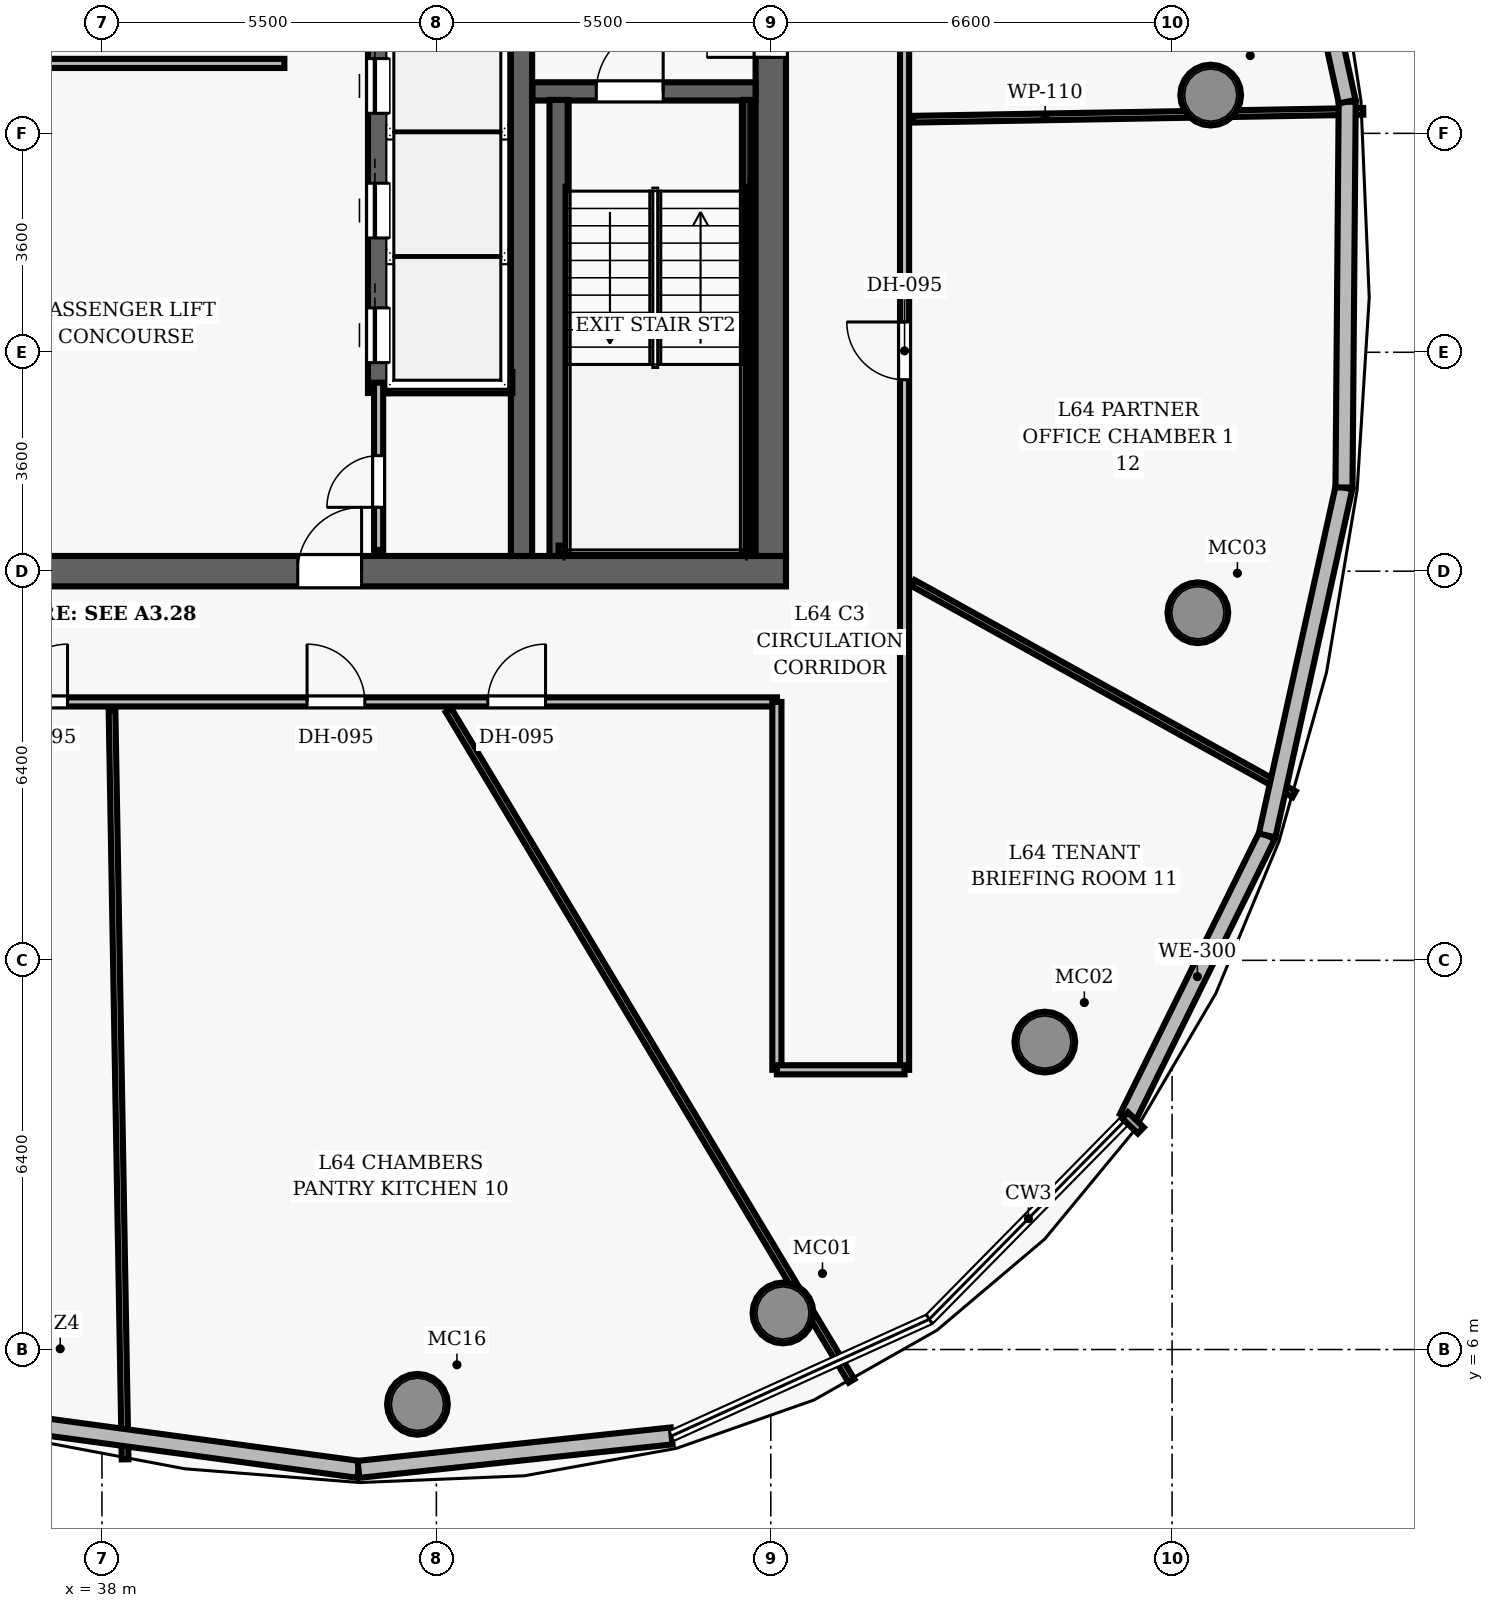
"""IFC4 building model, lengths in metres.
Left out: names, types, materials, properties, quantities, classifications, styles, units other than length and angle.
Written with IfcOpenShell. Run it as: python <this file> out.ifc"""

import sys

from ifc_helpers import new_model, si_unit, direction, frame, frame_2d, origin, origin_2d, place, context, subcontext, project, spatial, rectangle, hollow_circle, extrude, element, fill, save


model = new_model("IFC4")
c1 = context("Model", 3, precision=1e-05, world=origin(), true_north=direction((0.0, 1.0)))
c2 = subcontext(c1, "Body", "Model", "MODEL_VIEW")
j1 = project(units=[si_unit("LENGTHUNIT", "METRE"), si_unit("PLANEANGLEUNIT", "RADIAN")], contexts=[c1])
p1 = place(None, origin())
s1 = spatial("IfcSite", under=j1, at=p1, CompositionType="ELEMENT")
p2 = place(p1, origin())
s2 = spatial("IfcBuilding", under=s1, at=p2, CompositionType="ELEMENT")
p3 = place(p2, frame((0.0, 0.0, 253.6)))
s3 = spatial("IfcBuildingStorey", under=s2, at=p3, CompositionType="ELEMENT", Elevation=253.6)
p4 = place(p3, frame((26.75, 18.8, 0.0), z_axis=(0.0, 0.0, 1.0), x_axis=(1.0, 0.0, 0.0)))
e1 = element("IfcWall", 1, at=p4, inside=s3, PredefinedType="SHEAR", context=c2, shape_type="SweptSolid", body=[
    extrude(rectangle(XDim=22.5, YDim=0.5, at=frame_2d((11.25, 0.0))), origin(), (0.0, 0.0, 1.0), 3.85),
])
p5 = place(p4, frame((14.47, 0.0, 0.0)))
e2 = element("IfcOpeningElement", 2, at=p5, cuts=e1, PredefinedType="OPENING", context=c2, shape_type="SweptSolid", body=[
    extrude(rectangle(XDim=1.05, YDim=2.15, at=frame_2d((0.525, 1.075))), frame((0.0, 0.26, 0.0), z_axis=(0.0, -1.0, 0.0), x_axis=(1.0, 0.0, 0.0)), (0.0, 0.0, 1.0), 0.52),
])
p6 = place(p3, frame((49.0, 19.05, 0.0), z_axis=(0.0, 0.0, 1.0), x_axis=(0.0, 1.0, 0.0)))
e3 = element("IfcWall", 3, at=p6, inside=s3, PredefinedType="SHEAR", context=c2, shape_type="SweptSolid", body=[
    extrude(rectangle(XDim=13.9, YDim=0.5, at=frame_2d((6.95, 0.0))), origin(), (0.0, 0.0, 1.0), 3.85),
])
p7 = place(p6, frame((8.2, 0.0, 0.0)))
e4 = element("IfcOpeningElement", 4, at=p7, cuts=e3, PredefinedType="OPENING", context=c2, shape_type="SweptSolid", body=[
    extrude(rectangle(XDim=1.05, YDim=2.15, at=frame_2d((0.525, 1.075))), frame((0.0, 0.26, 0.0), z_axis=(0.0, -1.0, 0.0), x_axis=(1.0, 0.0, 0.0)), (0.0, 0.0, 1.0), 0.52),
])
p8 = place(p3, frame((44.9, 19.05, 0.0), z_axis=(0.0, 0.0, 1.0), x_axis=(0.0, 1.0, 0.0)))
e5 = element("IfcWall", 5, at=p8, inside=s3, PredefinedType="SHEAR", context=c2, shape_type="SweptSolid", body=[
    extrude(rectangle(XDim=13.9, YDim=0.35, at=frame_2d((6.95, 0.0))), origin(), (0.0, 0.0, 1.0), 3.85),
])
for number, where, z_axis, x_axis in (
    (6, (49.2, 6.601, 0.0), (0.0, 0.0, 1.0), (1.0, 0.0, 0.0)),
    (7, (53.506, 11.056, 0.0), (0.0, 0.0, 1.0), (1.0, 0.0, 0.0)),
    (8, (56.024, 18.116, 0.0), (0.0, 0.0, 1.0), (1.0, 0.0, 0.0)),
    (9, (56.235, 26.629, 0.0), (0.0, 0.0, 1.0), (1.0, 0.0, 0.0)),
    (10, (43.188, 5.099, 0.0), (0.0, 0.0, 1.0), (1.0, 0.0, 0.0)),
):
    element("IfcColumn", number, at=place(p3, frame(where, z_axis=z_axis, x_axis=x_axis)), inside=s3, PredefinedType="COLUMN", context=c2, shape_type="SweptSolid", body=[
        extrude(hollow_circle(Radius=0.5, WallThickness=0.045, at=origin_2d()), origin(), (0.0, 0.0, 1.0), 3.85),
    ])
p9 = place(p3, frame((45.08, 26.69, 0.0), z_axis=(0.0, 0.0, 1.0), x_axis=(1.0, 0.0, 0.0)))
e11 = element("IfcWall", 11, at=p9, inside=s3, PredefinedType="SHEAR", context=c2, shape_type="SweptSolid", body=[
    extrude(rectangle(XDim=3.67, YDim=0.3, at=frame_2d((1.835, 0.0))), origin(), (0.0, 0.0, 1.0), 3.85),
])
p10 = place(p9, frame((1.05, 0.0, 0.0)))
e12 = element("IfcOpeningElement", 12, at=p10, cuts=e11, PredefinedType="OPENING", context=c2, shape_type="SweptSolid", body=[
    extrude(rectangle(XDim=1.1, YDim=2.15, at=frame_2d((0.55, 1.075))), frame((0.0, 0.16, 0.0), z_axis=(0.0, -1.0, 0.0), x_axis=(1.0, 0.0, 0.0)), (0.0, 0.0, 1.0), 0.32),
])
p11 = place(p3, frame((45.51, 19.05, 0.0), z_axis=(0.0, 0.0, 1.0), x_axis=(0.0, 1.0, 0.0)))
e13 = element("IfcWall", 13, at=p11, inside=s3, PredefinedType="SHEAR", context=c2, shape_type="SweptSolid", body=[
    extrude(rectangle(XDim=7.5, YDim=0.3, at=frame_2d((3.75, 0.0))), origin(), (0.0, 0.0, 1.0), 3.85),
])
p12 = place(p3, frame((48.605, 19.1, 0.0), z_axis=(0.0, 0.0, 1.0), x_axis=(0.0, 1.0, 0.0)))
e14 = element("IfcWall", 14, at=p12, inside=s3, PredefinedType="SHEAR", context=c2, shape_type="SweptSolid", body=[
    extrude(rectangle(XDim=7.45, YDim=0.12, at=frame_2d((3.725, 0.0))), origin(), (0.0, 0.0, 1.0), 3.85),
])
p13 = place(p3, frame((45.51, 19.16, 0.0), z_axis=(0.0, 0.0, 1.0), x_axis=(1.0, 0.0, 0.0)))
e15 = element("IfcWall", 15, at=p13, inside=s3, PredefinedType="SHEAR", context=c2, shape_type="SweptSolid", body=[
    extrude(rectangle(XDim=3.095, YDim=0.12, at=frame_2d((1.547, 0.0))), origin(), (0.0, 0.0, 1.0), 3.85),
])
p14 = place(p3, frame((42.55, 21.73, 0.0), z_axis=(0.0, 0.0, 1.0), x_axis=(0.0, 1.0, 0.0)))
e16 = element("IfcWall", 16, at=p14, inside=s3, PredefinedType="SHEAR", context=c2, shape_type="SweptSolid", body=[
    extrude(rectangle(XDim=6.54, YDim=0.35, at=frame_2d((3.27, 0.0))), origin(), (0.0, 0.0, 1.0), 3.04),
])
p15 = place(p14, frame((0.5, 0.0, 0.0)))
e17 = element("IfcOpeningElement", 17, at=p15, cuts=e16, PredefinedType="OPENING", context=c2, shape_type="SweptSolid", body=[
    extrude(rectangle(XDim=0.9, YDim=2.15, at=frame_2d((0.45, 1.075))), frame((0.0, 0.185, 0.0), z_axis=(0.0, -1.0, 0.0), x_axis=(1.0, 0.0, 0.0)), (0.0, 0.0, 1.0), 0.37),
])
p16 = place(p14, frame((2.55, 0.0, 0.0)))
e18 = element("IfcOpeningElement", 18, at=p16, cuts=e16, PredefinedType="OPENING", context=c2, shape_type="SweptSolid", body=[
    extrude(rectangle(XDim=0.9, YDim=2.15, at=frame_2d((0.45, 1.075))), frame((0.0, 0.185, 0.0), z_axis=(0.0, -1.0, 0.0), x_axis=(1.0, 0.0, 0.0)), (0.0, 0.0, 1.0), 0.37),
])
p17 = place(p14, frame((4.6, 0.0, 0.0)))
e19 = element("IfcOpeningElement", 19, at=p17, cuts=e16, PredefinedType="OPENING", context=c2, shape_type="SweptSolid", body=[
    extrude(rectangle(XDim=0.9, YDim=2.15, at=frame_2d((0.45, 1.075))), frame((0.0, 0.185, 0.0), z_axis=(0.0, -1.0, 0.0), x_axis=(1.0, 0.0, 0.0)), (0.0, 0.0, 1.0), 0.37),
])
p18 = place(p3, frame((42.72, 21.9, 0.0), z_axis=(0.0, 0.0, 1.0), x_axis=(1.0, 0.0, 0.0)))
e20 = element("IfcWall", 20, at=p18, inside=s3, PredefinedType="SHEAR", context=c2, shape_type="SweptSolid", body=[
    extrude(rectangle(XDim=2.03, YDim=0.35, at=frame_2d((1.015, 0.0))), origin(), (0.0, 0.0, 1.0), 3.04),
])
p19 = place(p3, frame((34.64, 27.15, 0.0), z_axis=(0.0, 0.0, 1.0), x_axis=(1.0, 0.0, 0.0)))
e21 = element("IfcWall", 21, at=p19, inside=s3, PredefinedType="PARTITIONING", context=c2, shape_type="SweptSolid", body=[
    extrude(rectangle(XDim=6.36, YDim=0.15, at=frame_2d((3.18, 0.0))), origin(), (0.0, 0.0, 1.0), 3.04),
])
p20 = place(p3, frame((42.55, 19.15, 0.0), z_axis=(0.0, 0.0, 1.0), x_axis=(0.0, 1.0, 0.0)))
e22 = element("IfcWall", 22, at=p20, inside=s3, PredefinedType="PARTITIONING", context=c2, shape_type="SweptSolid", body=[
    extrude(rectangle(XDim=2.75, YDim=0.15, at=frame_2d((1.375, 0.0))), origin(), (0.0, 0.0, 1.0), 3.04),
])
p21 = place(p20, frame((0.7, 0.0, 0.0)))
e23 = element("IfcOpeningElement", 23, at=p21, cuts=e22, PredefinedType="OPENING", context=c2, shape_type="SweptSolid", body=[
    extrude(rectangle(XDim=0.85, YDim=2.1, at=frame_2d((0.425, 1.05))), frame((0.0, 0.085, 0.0), z_axis=(0.0, -1.0, 0.0), x_axis=(1.0, 0.0, 0.0)), (0.0, 0.0, 1.0), 0.17),
])
p22 = place(p3, frame((26.9, 16.65, 0.0), z_axis=(0.0, 0.0, 1.0), x_axis=(1.0, 0.0, 0.0)))
e24 = element("IfcWall", 24, at=p22, inside=s3, PredefinedType="PARTITIONING", context=c2, shape_type="SweptSolid", body=[
    extrude(rectangle(XDim=22.2, YDim=0.15, at=frame_2d((11.1, 0.0))), origin(), (0.0, 0.0, 1.0), 3.04),
])
p23 = place(p22, frame((4.135, 0.0, 0.0)))
e25 = element("IfcOpeningElement", 25, at=p23, cuts=e24, PredefinedType="OPENING", context=c2, shape_type="SweptSolid", body=[
    extrude(rectangle(XDim=0.95, YDim=2.15, at=frame_2d((0.475, 1.075))), frame((0.0, 0.085, 0.0), z_axis=(0.0, -1.0, 0.0), x_axis=(1.0, 0.0, 0.0)), (0.0, 0.0, 1.0), 0.17),
])
p24 = place(p22, frame((9.584, 0.0, 0.0)))
e26 = element("IfcOpeningElement", 26, at=p24, cuts=e24, PredefinedType="OPENING", context=c2, shape_type="SweptSolid", body=[
    extrude(rectangle(XDim=0.95, YDim=2.15, at=frame_2d((0.475, 1.075))), frame((0.0, 0.085, 0.0), z_axis=(0.0, -1.0, 0.0), x_axis=(1.0, 0.0, 0.0)), (0.0, 0.0, 1.0), 0.17),
])
p25 = place(p22, frame((14.473, 0.0, 0.0)))
e27 = element("IfcOpeningElement", 27, at=p25, cuts=e24, PredefinedType="OPENING", context=c2, shape_type="SweptSolid", body=[
    extrude(rectangle(XDim=0.95, YDim=2.15, at=frame_2d((0.475, 1.075))), frame((0.0, 0.085, 0.0), z_axis=(0.0, -1.0, 0.0), x_axis=(1.0, 0.0, 0.0)), (0.0, 0.0, 1.0), 0.17),
])
p26 = place(p22, frame((17.445, 0.0, 0.0)))
e28 = element("IfcOpeningElement", 28, at=p26, cuts=e24, PredefinedType="OPENING", context=c2, shape_type="SweptSolid", body=[
    extrude(rectangle(XDim=0.95, YDim=2.15, at=frame_2d((0.475, 1.075))), frame((0.0, 0.085, 0.0), z_axis=(0.0, -1.0, 0.0), x_axis=(1.0, 0.0, 0.0)), (0.0, 0.0, 1.0), 0.17),
])
p27 = place(p3, frame((51.2, 10.6, 0.0), z_axis=(0.0, 0.0, 1.0), x_axis=(0.0, 1.0, 0.0)))
e29 = element("IfcWall", 29, at=p27, inside=s3, PredefinedType="PARTITIONING", context=c2, shape_type="SweptSolid", body=[
    extrude(rectangle(XDim=30.8, YDim=0.15, at=frame_2d((15.4, 0.0))), origin(), (0.0, 0.0, 1.0), 3.04),
])
p28 = place(p27, frame((17.79, 0.0, 0.0)))
e30 = element("IfcOpeningElement", 30, at=p28, cuts=e29, PredefinedType="OPENING", context=c2, shape_type="SweptSolid", body=[
    extrude(rectangle(XDim=0.95, YDim=2.15, at=frame_2d((0.475, 1.075))), frame((0.0, 0.085, 0.0), z_axis=(0.0, -1.0, 0.0), x_axis=(1.0, 0.0, 0.0)), (0.0, 0.0, 1.0), 0.17),
])
p29 = place(p27, frame((11.348, 0.0, 0.0)))
e31 = element("IfcOpeningElement", 31, at=p29, cuts=e29, PredefinedType="OPENING", context=c2, shape_type="SweptSolid", body=[
    extrude(rectangle(XDim=0.95, YDim=2.15, at=frame_2d((0.475, 1.075))), frame((0.0, 0.085, 0.0), z_axis=(0.0, -1.0, 0.0), x_axis=(1.0, 0.0, 0.0)), (0.0, 0.0, 1.0), 0.17),
])
p30 = place(p3, frame((49.1, 10.6, 0.0), z_axis=(0.0, 0.0, 1.0), x_axis=(0.0, 1.0, 0.0)))
e32 = element("IfcWall", 32, at=p30, inside=s3, PredefinedType="PARTITIONING", context=c2, shape_type="SweptSolid", body=[
    extrude(rectangle(XDim=6.05, YDim=0.15, at=frame_2d((3.025, 0.0))), origin(), (0.0, 0.0, 1.0), 3.04),
])
p31 = place(p3, frame((49.1, 10.6, 0.0), z_axis=(0.0, 0.0, 1.0), x_axis=(1.0, 0.0, 0.0)))
e33 = element("IfcWall", 33, at=p31, inside=s3, PredefinedType="PARTITIONING", context=c2, shape_type="SweptSolid", body=[
    extrude(rectangle(XDim=2.1, YDim=0.15, at=frame_2d((1.05, 0.0))), origin(), (0.0, 0.0, 1.0), 3.04),
])
p32 = place(p3, frame((51.34, 26.233, 0.0), z_axis=(0.0, 0.0, 1.0), x_axis=(0.999847881994, 0.017441699244, 0.0)))
e34 = element("IfcWall", 34, at=p32, inside=s3, PredefinedType="PARTITIONING", context=c2, shape_type="SweptSolid", body=[
    extrude(rectangle(XDim=7.405, YDim=0.11, at=frame_2d((3.702, 0.0))), origin(), (0.0, 0.0, 1.0), 3.04),
])
p33 = place(p3, frame((38.166, 16.51, 0.0), z_axis=(0.0, 0.0, 1.0), x_axis=(0.017460864441, -0.999847547486, 0.0)))
e35 = element("IfcWall", 35, at=p33, inside=s3, PredefinedType="PARTITIONING", context=c2, shape_type="SweptSolid", body=[
    extrude(rectangle(XDim=12.318, YDim=0.11, at=frame_2d((6.159, 0.0))), origin(), (0.0, 0.0, 1.0), 3.04),
])
p34 = place(p3, frame((43.702, 16.51, 0.0), z_axis=(0.0, 0.0, 1.0), x_axis=(0.51503438344, -0.85716951875, 0.0)))
e36 = element("IfcWall", 36, at=p34, inside=s3, PredefinedType="PARTITIONING", context=c2, shape_type="SweptSolid", body=[
    extrude(rectangle(XDim=12.862, YDim=0.11, at=frame_2d((6.431, 0.0))), origin(), (0.0, 0.0, 1.0), 3.04),
])
p35 = place(p3, frame((51.34, 18.605, 0.0), z_axis=(0.0, 0.0, 1.0), x_axis=(0.874626215233, -0.484797879149, 0.0)))
e37 = element("IfcWall", 37, at=p35, inside=s3, PredefinedType="PARTITIONING", context=c2, shape_type="SweptSolid", body=[
    extrude(rectangle(XDim=7.165, YDim=0.11, at=frame_2d((3.582, 0.0))), origin(), (0.0, 0.0, 1.0), 3.04),
])
p36 = place(p3, frame((57.163, 14.454, 0.0), z_axis=(0.0, 0.0, 1.0), x_axis=(-0.44296604634, -0.896538388352, 0.0)))
e38 = element("IfcWall", 38, at=p36, inside=s3, PredefinedType="SOLIDWALL", context=c2, shape_type="SweptSolid", body=[
    extrude(rectangle(XDim=5.179, YDim=0.28, at=frame_2d((2.59, 0.0))), origin(), (0.0, 0.0, 1.0), 3.625),
])
p37 = place(p3, frame((58.427, 20.176, 0.0), z_axis=(0.0, 0.0, 1.0), x_axis=(-0.215730402944, -0.976452965199, 0.0)))
e39 = element("IfcWall", 39, at=p37, inside=s3, PredefinedType="SOLIDWALL", context=c2, shape_type="SweptSolid", body=[
    extrude(rectangle(XDim=5.86, YDim=0.28, at=frame_2d((2.93, 0.0))), origin(), (0.0, 0.0, 1.0), 3.625),
])
p38 = place(p3, frame((58.48, 26.521, 0.0), z_axis=(0.0, 0.0, 1.0), x_axis=(-0.008349395362, -0.999965143191, 0.0)))
e40 = element("IfcWall", 40, at=p38, inside=s3, PredefinedType="SOLIDWALL", context=c2, shape_type="SweptSolid", body=[
    extrude(rectangle(XDim=6.345, YDim=0.28, at=frame_2d((3.173, 0.0))), origin(), (0.0, 0.0, 1.0), 3.625),
])
p39 = place(p3, frame((57.09, 32.898, 0.0), z_axis=(0.0, 0.0, 1.0), x_axis=(0.212892433961, -0.977075642702, 0.0)))
e41 = element("IfcWall", 41, at=p39, inside=s3, PredefinedType="SOLIDWALL", context=c2, shape_type="SweptSolid", body=[
    extrude(rectangle(XDim=6.526, YDim=0.28, at=frame_2d((3.263, 0.0))), origin(), (0.0, 0.0, 1.0), 3.625),
])
p40 = place(p3, frame((42.219, 4.029, 0.0), z_axis=(0.0, 0.0, 1.0), x_axis=(-0.990881813427, 0.134733929727, 0.0)))
e42 = element("IfcWall", 42, at=p40, inside=s3, PredefinedType="SOLIDWALL", context=c2, shape_type="SweptSolid", body=[
    extrude(rectangle(XDim=5.86, YDim=0.28, at=frame_2d((2.93, 0.0))), origin(), (0.0, 0.0, 1.0), 3.625),
])
p41 = place(p3, frame((47.369, 4.579, 0.0), z_axis=(0.0, 0.0, 1.0), x_axis=(-0.994344408772, -0.106203562765, 0.0)))
e43 = element("IfcWall", 43, at=p41, inside=s3, PredefinedType="SOLIDWALL", context=c2, shape_type="SweptSolid", body=[
    extrude(rectangle(XDim=5.179, YDim=0.28, at=frame_2d((2.59, 0.0))), origin(), (0.0, 0.0, 1.0), 3.625),
])
p42 = place(p10, origin())
e44 = element("IfcDoor", 44, at=p42, inside=s3, OperationType="SINGLE_SWING_RIGHT", PredefinedType="DOOR", context=c2, shape_type="SweptSolid", body=[
    extrude(rectangle(XDim=1.1, YDim=2.15, at=frame_2d((0.55, 1.075))), frame((0.0, 0.025, 0.0), z_axis=(0.0, -1.0, 0.0), x_axis=(1.0, 0.0, 0.0)), (0.0, 0.0, 1.0), 0.05),
])
fill(e12, e44)
p43 = place(p7, origin())
e45 = element("IfcDoor", 45, at=p43, inside=s3, OperationType="SINGLE_SWING_LEFT", PredefinedType="DOOR", context=c2, shape_type="SweptSolid", body=[
    extrude(rectangle(XDim=1.05, YDim=2.15, at=frame_2d((0.525, 1.075))), frame((0.0, 0.025, 0.0), z_axis=(0.0, -1.0, 0.0), x_axis=(1.0, 0.0, 0.0)), (0.0, 0.0, 1.0), 0.05),
])
fill(e4, e45)
p44 = place(p5, origin())
e46 = element("IfcDoor", 46, at=p44, inside=s3, OperationType="SINGLE_SWING_RIGHT", PredefinedType="DOOR", context=c2, shape_type="SweptSolid", body=[
    extrude(rectangle(XDim=1.05, YDim=2.15, at=frame_2d((0.525, 1.075))), frame((0.0, 0.025, 0.0), z_axis=(0.0, -1.0, 0.0), x_axis=(1.0, 0.0, 0.0)), (0.0, 0.0, 1.0), 0.05),
])
fill(e2, e46)
p45 = place(p21, origin())
e47 = element("IfcDoor", 47, at=p45, inside=s3, OperationType="SINGLE_SWING_LEFT", PredefinedType="DOOR", context=c2, shape_type="SweptSolid", body=[
    extrude(rectangle(XDim=0.85, YDim=2.1, at=frame_2d((0.425, 1.05))), frame((0.0, 0.025, 0.0), z_axis=(0.0, -1.0, 0.0), x_axis=(1.0, 0.0, 0.0)), (0.0, 0.0, 1.0), 0.05),
])
fill(e23, e47)
p46 = place(p24, origin())
e48 = element("IfcDoor", 48, at=p46, inside=s3, OperationType="SINGLE_SWING_RIGHT", PredefinedType="DOOR", context=c2, shape_type="SweptSolid", body=[
    extrude(rectangle(XDim=0.95, YDim=2.15, at=frame_2d((0.475, 1.075))), frame((0.0, 0.025, 0.0), z_axis=(0.0, -1.0, 0.0), x_axis=(1.0, 0.0, 0.0)), (0.0, 0.0, 1.0), 0.05),
])
fill(e26, e48)
p47 = place(p25, origin())
e49 = element("IfcDoor", 49, at=p47, inside=s3, OperationType="SINGLE_SWING_LEFT", PredefinedType="DOOR", context=c2, shape_type="SweptSolid", body=[
    extrude(rectangle(XDim=0.95, YDim=2.15, at=frame_2d((0.475, 1.075))), frame((0.0, 0.025, 0.0), z_axis=(0.0, -1.0, 0.0), x_axis=(1.0, 0.0, 0.0)), (0.0, 0.0, 1.0), 0.05),
])
fill(e27, e49)
p48 = place(p26, origin())
e50 = element("IfcDoor", 50, at=p48, inside=s3, OperationType="SINGLE_SWING_RIGHT", PredefinedType="DOOR", context=c2, shape_type="SweptSolid", body=[
    extrude(rectangle(XDim=0.95, YDim=2.15, at=frame_2d((0.475, 1.075))), frame((0.0, 0.025, 0.0), z_axis=(0.0, -1.0, 0.0), x_axis=(1.0, 0.0, 0.0)), (0.0, 0.0, 1.0), 0.05),
])
fill(e28, e50)
p49 = place(p29, origin())
e51 = element("IfcDoor", 51, at=p49, inside=s3, OperationType="SINGLE_SWING_RIGHT", PredefinedType="DOOR", context=c2, shape_type="SweptSolid", body=[
    extrude(rectangle(XDim=0.95, YDim=2.15, at=frame_2d((0.475, 1.075))), frame((0.0, 0.025, 0.0), z_axis=(0.0, -1.0, 0.0), x_axis=(1.0, 0.0, 0.0)), (0.0, 0.0, 1.0), 0.05),
])
fill(e31, e51)
p50 = place(p15, origin())
e52 = element("IfcDoor", 52, at=p50, inside=s3, OperationType="SLIDING_TO_LEFT", PredefinedType="DOOR", context=c2, shape_type="SweptSolid", body=[
    extrude(rectangle(XDim=0.9, YDim=2.15, at=frame_2d((0.45, 1.075))), frame((0.0, 0.025, 0.0), z_axis=(0.0, -1.0, 0.0), x_axis=(1.0, 0.0, 0.0)), (0.0, 0.0, 1.0), 0.05),
])
fill(e17, e52)
p51 = place(p16, origin())
e53 = element("IfcDoor", 53, at=p51, inside=s3, OperationType="SLIDING_TO_LEFT", PredefinedType="DOOR", context=c2, shape_type="SweptSolid", body=[
    extrude(rectangle(XDim=0.9, YDim=2.15, at=frame_2d((0.45, 1.075))), frame((0.0, 0.025, 0.0), z_axis=(0.0, -1.0, 0.0), x_axis=(1.0, 0.0, 0.0)), (0.0, 0.0, 1.0), 0.05),
])
fill(e18, e53)
p52 = place(p17, origin())
e54 = element("IfcDoor", 54, at=p52, inside=s3, OperationType="SLIDING_TO_LEFT", PredefinedType="DOOR", context=c2, shape_type="SweptSolid", body=[
    extrude(rectangle(XDim=0.9, YDim=2.15, at=frame_2d((0.45, 1.075))), frame((0.0, 0.025, 0.0), z_axis=(0.0, -1.0, 0.0), x_axis=(1.0, 0.0, 0.0)), (0.0, 0.0, 1.0), 0.05),
])
fill(e19, e54)
save(model, sys.argv[1])
